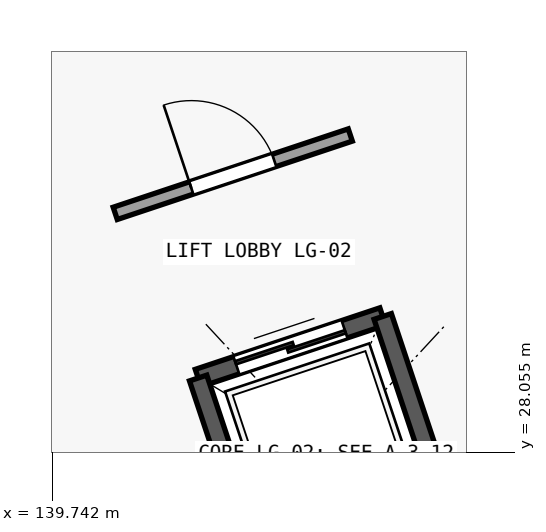
"""IFC4 building model, lengths in metres.
Left out: names, types, materials, properties, quantities, classifications, styles, units other than length and angle.
Written with IfcOpenShell. Run it as: python <this file> out.ifc"""

import sys

from ifc_helpers import new_model, si_unit, direction, frame, frame_2d, origin, place, context, subcontext, project, spatial, rectangle, extrude, element, fill, save


model = new_model("IFC4")
c1 = context("Model", 3, precision=1e-05, world=origin(), true_north=direction((0.0, 1.0)))
c2 = subcontext(c1, "Body", "Model", "MODEL_VIEW")
j1 = project(units=[si_unit("LENGTHUNIT", "METRE"), si_unit("PLANEANGLEUNIT", "RADIAN")], contexts=[c1])
p1 = place(None, origin())
s1 = spatial("IfcSite", under=j1, at=p1, CompositionType="ELEMENT")
p2 = place(p1, origin())
s2 = spatial("IfcBuilding", under=s1, at=p2, CompositionType="ELEMENT")
p3 = place(p2, origin())
s3 = spatial("IfcBuildingStorey", under=s2, at=p3, CompositionType="ELEMENT", Elevation=0.0)
p4 = place(p3, frame((141.664, 29.032, 0.0), z_axis=(0.0, 0.0, 1.0), x_axis=(0.948673760334, 0.316256377729, 0.0)))
e1 = element("IfcWall", 1, at=p4, inside=s3, PredefinedType="SOLIDWALL", context=c2, shape_type="SweptSolid", body=[
    extrude(rectangle(XDim=2.56, YDim=0.24, at=frame_2d((1.28, 0.0))), origin(), (0.0, 0.0, 1.0), 5.08),
])
p5 = place(p4, frame((0.53, 0.0, 0.0)))
e2 = element("IfcOpeningElement", 2, at=p5, cuts=e1, PredefinedType="OPENING", context=c2, shape_type="SweptSolid", body=[
    extrude(rectangle(XDim=1.5, YDim=2.25, at=frame_2d((0.75, 1.125))), frame((0.0, 0.13, 0.0), z_axis=(0.0, -1.0, 0.0), x_axis=(1.0, 0.0, 0.0)), (0.0, 0.0, 1.0), 0.26),
])
for number, where, z_axis, x_axis in (
    (3, (142.6, 26.224, 0.0), (0.0, 0.0, 1.0), (-0.316, 0.949, 0.0)),
    (4, (144.093, 29.842, 0.0), (0.0, 0.0, 1.0), (0.316, -0.949, 0.0)),
):
    element("IfcWall", number, at=place(p3, frame(where, z_axis=z_axis, x_axis=x_axis)), inside=s3, PredefinedType="SOLIDWALL", context=c2, shape_type="SweptSolid", body=[
        extrude(rectangle(XDim=2.96, YDim=0.24, at=frame_2d((1.48, 0.0))), origin(), (0.0, 0.0, 1.0), 5.08),
    ])
p6 = place(p3, frame((140.573, 31.198, 0.0), z_axis=(0.0, 0.0, 1.0), x_axis=(0.948698274856, 0.316182832053, 0.0)))
e5 = element("IfcWall", 5, at=p6, inside=s3, PredefinedType="PARTITIONING", context=c2, shape_type="SweptSolid", body=[
    extrude(rectangle(XDim=3.26, YDim=0.17, at=frame_2d((1.63, 0.0))), origin(), (0.0, 0.0, 1.0), 5.08),
])
p7 = place(p6, frame((1.055, 0.0, 0.0)))
e6 = element("IfcOpeningElement", 6, at=p7, cuts=e5, PredefinedType="OPENING", context=c2, shape_type="SweptSolid", body=[
    extrude(rectangle(XDim=1.15, YDim=2.15, at=frame_2d((0.575, 1.075))), frame((0.0, 0.095, 0.0), z_axis=(0.0, -1.0, 0.0), x_axis=(1.0, 0.0, 0.0)), (0.0, 0.0, 1.0), 0.19),
])
p8 = place(p5, origin())
e7 = element("IfcDoor", 7, at=p8, inside=s3, OperationType="DOUBLE_DOOR_SLIDING", PredefinedType="DOOR", context=c2, shape_type="SweptSolid", body=[
    extrude(rectangle(XDim=1.5, YDim=2.25, at=frame_2d((0.75, 1.125))), frame((0.0, 0.025, 0.0), z_axis=(0.0, -1.0, 0.0), x_axis=(1.0, 0.0, 0.0)), (0.0, 0.0, 1.0), 0.05),
])
fill(e2, e7)
p9 = place(p7, origin())
e8 = element("IfcDoor", 8, at=p9, inside=s3, OperationType="SINGLE_SWING_LEFT", PredefinedType="DOOR", context=c2, shape_type="SweptSolid", body=[
    extrude(rectangle(XDim=1.15, YDim=2.15, at=frame_2d((0.575, 1.075))), frame((0.0, 0.025, 0.0), z_axis=(0.0, -1.0, 0.0), x_axis=(1.0, 0.0, 0.0)), (0.0, 0.0, 1.0), 0.05),
])
fill(e6, e8)
save(model, sys.argv[1])
